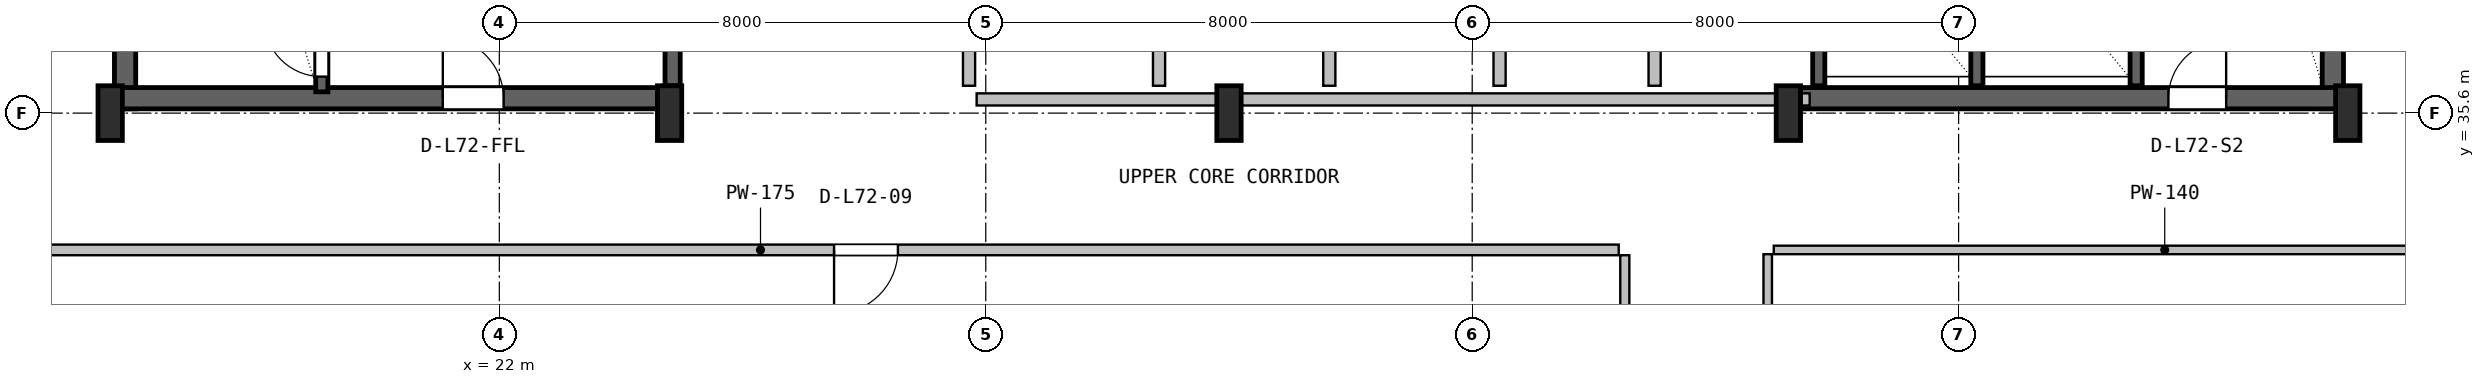
"""IFC4 building model, lengths in metres.
Left out: names, types, materials, properties, quantities, classifications, styles, units other than length and angle.
Written with IfcOpenShell. Run it as: python <this file> out.ifc"""

import sys

from ifc_helpers import new_model, si_unit, direction, frame, frame_2d, origin, origin_2d, place, context, subcontext, project, spatial, rectangle, i_section, extrude, source, transform, mapped, element, fill, save


model = new_model("IFC4")
c1 = context("Model", 3, precision=1e-05, world=origin(), true_north=direction((0.0, 1.0)))
c2 = subcontext(c1, "Body", "Model", "MODEL_VIEW")
j1 = project(units=[si_unit("LENGTHUNIT", "METRE"), si_unit("PLANEANGLEUNIT", "RADIAN")], contexts=[c1])
p1 = place(None, origin())
s1 = spatial("IfcSite", under=j1, at=p1, CompositionType="ELEMENT")
p2 = place(p1, origin())
s2 = spatial("IfcBuilding", under=s1, at=p2, CompositionType="ELEMENT")
p3 = place(p2, frame((0.0, 0.0, 288.8)))
s3 = spatial("IfcBuildingStorey", under=s2, at=p3, CompositionType="ELEMENT", Elevation=288.8)
for number, where, z_axis, x_axis in (
    (1, (15.845, 35.67, 0.0), (0.0, 0.0, 1.0), (0.0, 1.0, 0.0)),
    (2, (52.155, 35.67, 0.0), (0.0, 0.0, 1.0), (0.0, 1.0, 0.0)),
):
    element("IfcWall", number, at=place(p3, frame(where, z_axis=z_axis, x_axis=x_axis)), inside=s3, PredefinedType="SHEAR", context=c2, shape_type="SweptSolid", body=[
        extrude(rectangle(XDim=11.13, YDim=0.35, at=frame_2d((5.565, 0.0))), origin(), (0.0, 0.0, 1.0), 3.55),
    ])
p4 = place(p3, frame((15.67, 35.845, 0.0), z_axis=(0.0, 0.0, 1.0), x_axis=(1.0, 0.0, 0.0)))
e3 = element("IfcWall", 3, at=p4, inside=s3, PredefinedType="SHEAR", context=c2, shape_type="SweptSolid", body=[
    extrude(rectangle(XDim=9.13, YDim=0.35, at=frame_2d((4.565, 0.0))), origin(), (0.0, 0.0, 1.0), 3.55),
])
p5 = place(p4, frame((5.4, 0.0, 0.0)))
e4 = element("IfcOpeningElement", 4, at=p5, cuts=e3, PredefinedType="OPENING", context=c2, shape_type="SweptSolid", body=[
    extrude(rectangle(XDim=1.0, YDim=2.1, at=frame_2d((0.5, 1.05))), frame((0.0, 0.185, 0.0), z_axis=(0.0, -1.0, 0.0), x_axis=(1.0, 0.0, 0.0)), (0.0, 0.0, 1.0), 0.37),
])
p6 = place(p3, frame((43.2, 35.845, 0.0), z_axis=(0.0, 0.0, 1.0), x_axis=(1.0, 0.0, 0.0)))
e5 = element("IfcWall", 5, at=p6, inside=s3, PredefinedType="SHEAR", context=c2, shape_type="SweptSolid", body=[
    extrude(rectangle(XDim=9.13, YDim=0.35, at=frame_2d((4.565, 0.0))), origin(), (0.0, 0.0, 1.0), 3.55),
])
p7 = place(p6, frame((6.25, 0.0, 0.0)))
e6 = element("IfcOpeningElement", 6, at=p7, cuts=e5, PredefinedType="OPENING", context=c2, shape_type="SweptSolid", body=[
    extrude(rectangle(XDim=0.95, YDim=2.1, at=frame_2d((0.475, 1.05))), frame((0.0, 0.185, 0.0), z_axis=(0.0, -1.0, 0.0), x_axis=(1.0, 0.0, 0.0)), (0.0, 0.0, 1.0), 0.37),
])
m1 = source(origin(), c2, "Body", "SweptSolid", [
    extrude(i_section(OverallWidth=0.4, OverallDepth=0.9, WebThickness=0.016, FlangeThickness=0.028, FilletRadius=0.016, at=origin_2d()), origin(), (0.0, 0.0, 1.0), 3.8),
])
for number, where, z_axis, x_axis in (
    (7, (15.6, 35.6, 0.0), (0.0, 0.0, 1.0), (1.0, 0.0, 0.0)),
    (8, (24.8, 35.6, 0.0), (0.0, 0.0, 1.0), (1.0, 0.0, 0.0)),
    (9, (34.0, 35.6, 0.0), (0.0, 0.0, 1.0), (1.0, 0.0, 0.0)),
    (10, (43.2, 35.6, 0.0), (0.0, 0.0, 1.0), (1.0, 0.0, 0.0)),
    (11, (52.4, 35.6, 0.0), (0.0, 0.0, 1.0), (1.0, 0.0, 0.0)),
):
    element("IfcColumn", number, at=place(p3, frame(where, z_axis=z_axis, x_axis=x_axis)), inside=s3, PredefinedType="COLUMN", context=c2, shape_type="MappedRepresentation", body=[
        mapped(m1, transform((0.0, 0.0, 0.0), x_axis=(1.0, 0.0, 0.0), y_axis=(0.0, 1.0, 0.0), z_axis=(0.0, 0.0, 1.0), scale=1.0)),
    ])
p8 = place(p3, frame((19.08, 35.95, 0.0), z_axis=(0.0, 0.0, 1.0), x_axis=(0.0, 1.0, 0.0)))
e12 = element("IfcWall", 12, at=p8, inside=s3, PredefinedType="SHEAR", context=c2, shape_type="SweptSolid", body=[
    extrude(rectangle(XDim=9.65, YDim=0.2, at=frame_2d((4.825, 0.0))), origin(), (0.0, 0.0, 1.0), 3.55),
])
p9 = place(p8, frame((0.25, 0.0, 0.0)))
e13 = element("IfcOpeningElement", 13, at=p9, cuts=e12, PredefinedType="OPENING", context=c2, shape_type="SweptSolid", body=[
    extrude(rectangle(XDim=0.95, YDim=2.1, at=frame_2d((0.475, 1.05))), frame((0.0, 0.11, 0.0), z_axis=(0.0, -1.0, 0.0), x_axis=(1.0, 0.0, 0.0)), (0.0, 0.0, 1.0), 0.22),
])
p10 = place(p3, frame((24.85, 36.05, 0.0), z_axis=(0.0, 0.0, 1.0), x_axis=(0.0, 1.0, 0.0)))
e14 = element("IfcWall", 14, at=p10, inside=s3, PredefinedType="SHEAR", context=c2, shape_type="SweptSolid", body=[
    extrude(rectangle(XDim=10.45, YDim=0.25, at=frame_2d((5.225, 0.0))), origin(), (0.0, 0.0, 1.0), 3.55),
])
p11 = place(p3, frame((48.92, 36.05, 0.0), z_axis=(0.0, 0.0, 1.0), x_axis=(0.0, 1.0, 0.0)))
e15 = element("IfcWall", 15, at=p11, inside=s3, PredefinedType="SHEAR", context=c2, shape_type="SweptSolid", body=[
    extrude(rectangle(XDim=10.5, YDim=0.2, at=frame_2d((5.25, 0.0))), origin(), (0.0, 0.0, 1.0), 3.55),
])
for number, where, z_axis, x_axis in (
    (16, (43.7, 36.05, 0.0), (0.0, 0.0, 1.0), (0.0, 1.0, 0.0)),
    (17, (46.3, 36.05, 0.0), (0.0, 0.0, 1.0), (0.0, 1.0, 0.0)),
):
    element("IfcWall", number, at=place(p3, frame(where, z_axis=z_axis, x_axis=x_axis)), inside=s3, PredefinedType="SHEAR", context=c2, shape_type="SweptSolid", body=[
        extrude(rectangle(XDim=3.05, YDim=0.2, at=frame_2d((1.525, 0.0))), origin(), (0.0, 0.0, 1.0), 3.55),
    ])
p12 = place(p3, frame((29.85, 35.825, 0.0), z_axis=(0.0, 0.0, 1.0), x_axis=(1.0, 0.0, 0.0)))
e18 = element("IfcWall", 18, at=p12, inside=s3, PredefinedType="SOLIDWALL", context=c2, shape_type="SweptSolid", body=[
    extrude(rectangle(XDim=13.7, YDim=0.2, at=frame_2d((6.85, 0.0))), origin(), (0.0, 0.0, 1.0), 2.575),
])
for number, where, z_axis, x_axis in (
    (19, (32.85, 36.05, 0.0), (0.0, 0.0, 1.0), (0.0, 1.0, 0.0)),
    (20, (29.725, 36.05, 0.0), (0.0, 0.0, 1.0), (0.0, 1.0, 0.0)),
    (21, (35.65, 36.05, 0.0), (0.0, 0.0, 1.0), (0.0, 1.0, 0.0)),
    (22, (38.45, 36.05, 0.0), (0.0, 0.0, 1.0), (0.0, 1.0, 0.0)),
):
    element("IfcWall", number, at=place(p3, frame(where, z_axis=z_axis, x_axis=x_axis)), inside=s3, PredefinedType="PLUMBINGWALL", context=c2, shape_type="SweptSolid", body=[
        extrude(rectangle(XDim=3.1, YDim=0.2, at=frame_2d((1.55, 0.0))), origin(), (0.0, 0.0, 1.0), 3.53),
    ])
p13 = place(p3, frame((41.0, 36.05, 0.0), z_axis=(0.0, 0.0, 1.0), x_axis=(0.0, 1.0, 0.0)))
e23 = element("IfcWall", 23, at=p13, inside=s3, PredefinedType="SOLIDWALL", context=c2, shape_type="SweptSolid", body=[
    extrude(rectangle(XDim=3.1, YDim=0.2, at=frame_2d((1.55, 0.0))), origin(), (0.0, 0.0, 1.0), 3.53),
])
p14 = place(p3, frame((40.51, 20.585, 0.0), z_axis=(0.0, 0.0, 1.0), x_axis=(0.0, 1.0, 0.0)))
e24 = element("IfcWall", 24, at=p14, inside=s3, PredefinedType="PARTITIONING", context=c2, shape_type="SweptSolid", body=[
    extrude(rectangle(XDim=12.678, YDim=0.15, at=frame_2d((6.339, 0.0))), origin(), (0.0, 0.0, 1.0), 2.981),
])
p15 = place(p3, frame((12.18, 33.35, 0.0), z_axis=(0.0, 0.0, 1.0), x_axis=(1.0, 0.0, 0.0)))
e25 = element("IfcWall", 25, at=p15, inside=s3, PredefinedType="PARTITIONING", context=c2, shape_type="SweptSolid", body=[
    extrude(rectangle(XDim=28.23, YDim=0.175, at=frame_2d((14.115, 0.0))), origin(), (0.0, 0.0, 1.0), 2.981),
])
p16 = place(p15, frame((15.325, 0.0, 0.0)))
e26 = element("IfcOpeningElement", 26, at=p16, cuts=e25, PredefinedType="OPENING", context=c2, shape_type="SweptSolid", body=[
    extrude(rectangle(XDim=1.05, YDim=2.1, at=frame_2d((0.525, 1.05))), frame((0.0, 0.098, 0.0), z_axis=(0.0, -1.0, 0.0), x_axis=(1.0, 0.0, 0.0)), (0.0, 0.0, 1.0), 0.195),
])
p17 = place(p3, frame((42.96, 33.35, 0.0), z_axis=(0.0, 0.0, 1.0), x_axis=(1.0, 0.0, 0.0)))
e27 = element("IfcWall", 27, at=p17, inside=s3, PredefinedType="PARTITIONING", context=c2, shape_type="SweptSolid", body=[
    extrude(rectangle(XDim=12.86, YDim=0.14, at=frame_2d((6.43, 0.0))), origin(), (0.0, 0.0, 1.0), 2.981),
])
p18 = place(p3, frame((42.86, 14.55, 0.0), z_axis=(0.0, 0.0, 1.0), x_axis=(0.0, 1.0, 0.0)))
e28 = element("IfcWall", 28, at=p18, inside=s3, PredefinedType="PARTITIONING", context=c2, shape_type="SweptSolid", body=[
    extrude(rectangle(XDim=18.73, YDim=0.14, at=frame_2d((9.365, 0.0))), origin(), (0.0, 0.0, 1.0), 2.981),
])
p19 = place(p18, frame((8.85, 0.0, 0.0)))
e29 = element("IfcOpeningElement", 29, at=p19, cuts=e28, PredefinedType="OPENING", context=c2, shape_type="SweptSolid", body=[
    extrude(rectangle(XDim=1.0, YDim=2.1, at=frame_2d((0.5, 1.05))), frame((0.0, 0.08, 0.0), z_axis=(0.0, -1.0, 0.0), x_axis=(1.0, 0.0, 0.0)), (0.0, 0.0, 1.0), 0.16),
])
m2 = source(origin(), c2, "Body", "SweptSolid", [
    extrude(rectangle(XDim=0.95, YDim=2.1, at=frame_2d((0.475, 1.05))), frame((0.0, 0.025, 0.0), z_axis=(0.0, -1.0, 0.0), x_axis=(1.0, 0.0, 0.0)), (0.0, 0.0, 1.0), 0.05),
])
p20 = place(p9, origin())
e30 = element("IfcDoor", 30, at=p20, inside=s3, OperationType="SINGLE_SWING_RIGHT", PredefinedType="DOOR", context=c2, shape_type="MappedRepresentation", body=[
    mapped(m2, transform((0.0, 0.0, 0.0), x_axis=(1.0, 0.0, 0.0), y_axis=(0.0, 1.0, 0.0), z_axis=(0.0, 0.0, 1.0), scale=1.0)),
])
fill(e13, e30)
m3 = source(origin(), c2, "Body", "SweptSolid", [
    extrude(rectangle(XDim=1.0, YDim=2.1, at=frame_2d((0.5, 1.05))), frame((0.0, 0.025, 0.0), z_axis=(0.0, -1.0, 0.0), x_axis=(1.0, 0.0, 0.0)), (0.0, 0.0, 1.0), 0.05),
])
p21 = place(p5, origin())
e31 = element("IfcDoor", 31, at=p21, inside=s3, OperationType="SINGLE_SWING_LEFT", PredefinedType="DOOR", context=c2, shape_type="MappedRepresentation", body=[
    mapped(m3, transform((0.0, 0.0, 0.0), x_axis=(1.0, 0.0, 0.0), y_axis=(0.0, 1.0, 0.0), z_axis=(0.0, 0.0, 1.0), scale=1.0)),
])
fill(e4, e31)
p22 = place(p7, origin())
e32 = element("IfcDoor", 32, at=p22, inside=s3, OperationType="SINGLE_SWING_RIGHT", PredefinedType="DOOR", context=c2, shape_type="MappedRepresentation", body=[
    mapped(m2, transform((0.0, 0.0, 0.0), x_axis=(1.0, 0.0, 0.0), y_axis=(0.0, 1.0, 0.0), z_axis=(0.0, 0.0, 1.0), scale=1.0)),
])
fill(e6, e32)
m4 = source(origin(), c2, "Body", "SweptSolid", [
    extrude(rectangle(XDim=1.05, YDim=2.1, at=frame_2d((0.525, 1.05))), frame((0.0, 0.025, 0.0), z_axis=(0.0, -1.0, 0.0), x_axis=(1.0, 0.0, 0.0)), (0.0, 0.0, 1.0), 0.05),
])
p23 = place(p16, frame((1.05, 0.0, 0.0), z_axis=(0.0, 0.0, 1.0), x_axis=(-1.0, 0.0, 0.0)))
e33 = element("IfcDoor", 33, at=p23, inside=s3, OperationType="SINGLE_SWING_LEFT", PredefinedType="DOOR", context=c2, shape_type="MappedRepresentation", body=[
    mapped(m4, transform((0.0, 0.0, 0.0), x_axis=(1.0, 0.0, 0.0), y_axis=(0.0, 1.0, 0.0), z_axis=(0.0, 0.0, 1.0), scale=1.0)),
])
fill(e26, e33)
save(model, sys.argv[1])
